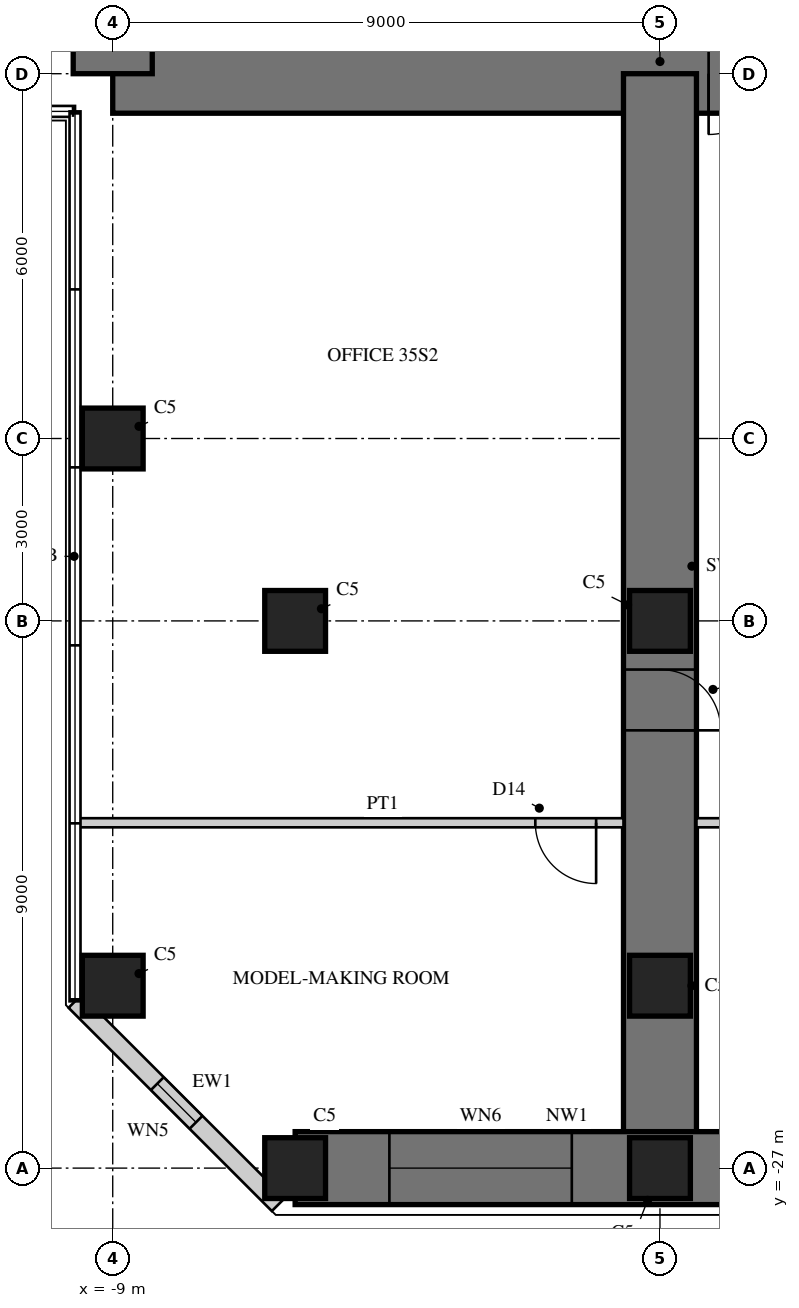
"""IFC4 building model, lengths in metres.
Left out: names, types, materials, properties, quantities, classifications, styles, units other than length and angle.
Written with IfcOpenShell. Run it as: python <this file> out.ifc"""

import sys

from ifc_helpers import new_model, si_unit, direction, frame, frame_2d, origin, origin_2d, place, context, subcontext, project, spatial, rectangle, hollow_rectangle, extrude, element, fill, save


model = new_model("IFC4")
c1 = context("Model", 3, precision=1e-05, world=origin(), true_north=direction((0.0, 1.0)))
c2 = subcontext(c1, "Body", "Model", "MODEL_VIEW")
j1 = project(units=[si_unit("LENGTHUNIT", "METRE"), si_unit("PLANEANGLEUNIT", "RADIAN")], contexts=[c1])
p1 = place(None, origin())
s1 = spatial("IfcSite", under=j1, at=p1, CompositionType="ELEMENT")
p2 = place(p1, origin())
s2 = spatial("IfcBuilding", under=s1, at=p2, CompositionType="ELEMENT")
p3 = place(p2, frame((0.0, 0.0, 144.5)))
s3 = spatial("IfcBuildingStorey", under=s2, at=p3, CompositionType="ELEMENT", Elevation=144.5)
p4 = place(p3, frame((-9.0, -9.0, 0.0), z_axis=(0.0, 0.0, 1.0), x_axis=(1.0, 0.0, 0.0)))
e1 = element("IfcWall", 1, at=p4, inside=s3, PredefinedType="SHEAR", context=c2, shape_type="SweptSolid", body=[
    extrude(rectangle(XDim=18.0, YDim=1.3, at=frame_2d((9.0, 0.0))), origin(), (0.0, 0.0, 1.0), 4.0),
])
p5 = place(p4, frame((9.8, 0.0, 0.0)))
e2 = element("IfcOpeningElement", 2, at=p5, cuts=e1, PredefinedType="OPENING", context=c2, shape_type="SweptSolid", body=[
    extrude(rectangle(XDim=1.0, YDim=2.4, at=frame_2d((0.5, 1.2))), frame((0.0, 0.66, 0.0), z_axis=(0.0, -1.0, 0.0), x_axis=(1.0, 0.0, 0.0)), (0.0, 0.0, 1.0), 1.32),
])
p6 = place(p3, frame((-9.0, 9.0, 0.0), z_axis=(0.0, 0.0, 1.0), x_axis=(0.0, -1.0, 0.0)))
e3 = element("IfcWall", 3, at=p6, inside=s3, PredefinedType="SHEAR", context=c2, shape_type="SweptSolid", body=[
    extrude(rectangle(XDim=18.0, YDim=1.3, at=frame_2d((9.0, 0.0))), origin(), (0.0, 0.0, 1.0), 4.0),
])
p7 = place(p6, frame((9.8, 0.0, 0.0)))
e4 = element("IfcOpeningElement", 4, at=p7, cuts=e3, PredefinedType="OPENING", context=c2, shape_type="SweptSolid", body=[
    extrude(rectangle(XDim=1.0, YDim=2.4, at=frame_2d((0.5, 1.2))), frame((0.0, 0.66, 0.0), z_axis=(0.0, -1.0, 0.0), x_axis=(1.0, 0.0, 0.0)), (0.0, 0.0, 1.0), 1.32),
])
p8 = place(p3, frame((0.0, -9.0, 0.0), z_axis=(0.0, 0.0, 1.0), x_axis=(0.0, -1.0, 0.0)))
e5 = element("IfcWall", 5, at=p8, inside=s3, PredefinedType="SHEAR", context=c2, shape_type="SweptSolid", body=[
    extrude(rectangle(XDim=18.0, YDim=1.2, at=frame_2d((9.0, 0.0))), origin(), (0.0, 0.0, 1.0), 4.0),
])
p9 = place(p8, frame((9.8, 0.0, 0.0)))
e6 = element("IfcOpeningElement", 6, at=p9, cuts=e5, PredefinedType="OPENING", context=c2, shape_type="SweptSolid", body=[
    extrude(rectangle(XDim=1.0, YDim=2.2, at=frame_2d((0.5, 1.1))), frame((0.0, 0.61, 0.0), z_axis=(0.0, -1.0, 0.0), x_axis=(1.0, 0.0, 0.0)), (0.0, 0.0, 1.0), 1.22),
])
p10 = place(p3, frame((-6.0, -27.0, 0.0), z_axis=(0.0, 0.0, 1.0), x_axis=(1.0, 0.0, 0.0)))
e7 = element("IfcWall", 7, at=p10, inside=s3, PredefinedType="SHEAR", context=c2, shape_type="SweptSolid", body=[
    extrude(rectangle(XDim=12.0, YDim=1.2, at=frame_2d((6.0, 0.0))), origin(), (0.0, 0.0, 1.0), 4.0),
])
p11 = place(p10, frame((1.55, 0.0, 0.6)))
e8 = element("IfcOpeningElement", 8, at=p11, cuts=e7, PredefinedType="OPENING", context=c2, shape_type="SweptSolid", body=[
    extrude(rectangle(XDim=3.0, YDim=2.4, at=frame_2d((1.5, 1.2))), frame((0.0, 0.61, 0.0), z_axis=(0.0, -1.0, 0.0), x_axis=(1.0, 0.0, 0.0)), (0.0, 0.0, 1.0), 1.22),
])
p12 = place(p10, frame((7.45, 0.0, 0.6)))
e9 = element("IfcOpeningElement", 9, at=p12, cuts=e7, PredefinedType="OPENING", context=c2, shape_type="SweptSolid", body=[
    extrude(rectangle(XDim=3.0, YDim=2.4, at=frame_2d((1.5, 1.2))), frame((0.0, 0.61, 0.0), z_axis=(0.0, -1.0, 0.0), x_axis=(1.0, 0.0, 0.0)), (0.0, 0.0, 1.0), 1.22),
])
for number, where, z_axis, x_axis in (
    (10, (-9.0, -15.0, 0.0), (0.0, 0.0, 1.0), (1.0, 0.0, 0.0)),
    (11, (-9.0, -24.0, 0.0), (0.0, 0.0, 1.0), (1.0, 0.0, 0.0)),
    (12, (-6.0, -27.0, 0.0), (0.0, 0.0, 1.0), (1.0, 0.0, 0.0)),
    (13, (0.0, -27.0, 0.0), (0.0, 0.0, 1.0), (1.0, 0.0, 0.0)),
    (14, (-6.0, -18.0, 0.0), (0.0, 0.0, 1.0), (1.0, 0.0, 0.0)),
    (15, (0.0, -18.0, 0.0), (0.0, 0.0, 1.0), (1.0, 0.0, 0.0)),
    (16, (0.0, -24.0, 0.0), (0.0, 0.0, 1.0), (1.0, 0.0, 0.0)),
):
    element("IfcColumn", number, at=place(p3, frame(where, z_axis=z_axis, x_axis=x_axis)), inside=s3, PredefinedType="COLUMN", context=c2, shape_type="SweptSolid", body=[
        extrude(rectangle(XDim=1.0, YDim=1.0, at=origin_2d()), origin(), (0.0, 0.0, 1.0), 4.0),
    ])
p13 = place(p3, frame((-9.62, -24.257, 0.0), z_axis=(0.0, 0.0, 1.0), x_axis=(0.707106781187, -0.707106781187, 0.0)))
e17 = element("IfcWall", 17, at=p13, inside=s3, PredefinedType="SOLIDWALL", context=c2, shape_type="SweptSolid", body=[
    extrude(rectangle(XDim=4.728, YDim=0.3, at=frame_2d((2.364, 0.0))), origin(), (0.0, 0.0, 1.0), 3.8),
])
p14 = place(p13, frame((1.914, 0.0, 0.3)))
e18 = element("IfcOpeningElement", 18, at=p14, cuts=e17, PredefinedType="OPENING", context=c2, shape_type="SweptSolid", body=[
    extrude(rectangle(XDim=0.9, YDim=2.4, at=frame_2d((0.45, 1.2))), frame((0.0, 0.16, 0.0), z_axis=(0.0, -1.0, 0.0), x_axis=(1.0, 0.0, 0.0)), (0.0, 0.0, 1.0), 0.32),
])
p15 = place(p3, frame((0.6, -21.32, 0.0), z_axis=(0.0, 0.0, 1.0), x_axis=(1.0, 0.0, 0.0)))
e19 = element("IfcWall", 19, at=p15, inside=s3, PredefinedType="PARTITIONING", context=c2, shape_type="SweptSolid", body=[
    extrude(rectangle(XDim=8.98, YDim=0.15, at=frame_2d((4.49, 0.0))), origin(), (0.0, 0.0, 1.0), 3.8),
])
p16 = place(p15, frame((0.45, 0.0, 0.0)))
e20 = element("IfcOpeningElement", 20, at=p16, cuts=e19, PredefinedType="OPENING", context=c2, shape_type="SweptSolid", body=[
    extrude(rectangle(XDim=1.0, YDim=2.2, at=frame_2d((0.5, 1.1))), frame((0.0, 0.085, 0.0), z_axis=(0.0, -1.0, 0.0), x_axis=(1.0, 0.0, 0.0)), (0.0, 0.0, 1.0), 0.17),
])
p17 = place(p3, frame((-9.58, -21.32, 0.0), z_axis=(0.0, 0.0, 1.0), x_axis=(1.0, 0.0, 0.0)))
e21 = element("IfcWall", 21, at=p17, inside=s3, PredefinedType="PARTITIONING", context=c2, shape_type="SweptSolid", body=[
    extrude(rectangle(XDim=8.98, YDim=0.15, at=frame_2d((4.49, 0.0))), origin(), (0.0, 0.0, 1.0), 3.8),
])
p18 = place(p17, frame((7.53, 0.0, 0.0)))
e22 = element("IfcOpeningElement", 22, at=p18, cuts=e21, PredefinedType="OPENING", context=c2, shape_type="SweptSolid", body=[
    extrude(rectangle(XDim=1.0, YDim=2.2, at=frame_2d((0.5, 1.1))), frame((0.0, 0.085, 0.0), z_axis=(0.0, -1.0, 0.0), x_axis=(1.0, 0.0, 0.0)), (0.0, 0.0, 1.0), 0.17),
])
p19 = place(p14, origin())
e23 = element("IfcWindow", 23, at=p19, inside=s3, PartitioningType="SINGLE_PANEL", PredefinedType="WINDOW", context=c2, shape_type="SweptSolid", body=[
    extrude(hollow_rectangle(XDim=0.9, YDim=2.4, WallThickness=0.06, at=frame_2d((0.45, 1.2))), frame((0.0, 0.03, 0.0), z_axis=(0.0, -1.0, 0.0), x_axis=(1.0, 0.0, 0.0)), (0.0, 0.0, 1.0), 0.06),
    extrude(rectangle(XDim=0.779, YDim=2.279, at=frame_2d((0.45, 1.2))), frame((0.0, 0.03, 0.0), z_axis=(0.0, -1.0, 0.0), x_axis=(1.0, 0.0, 0.0)), (0.0, 0.0, 1.0), 0.06),
])
fill(e18, e23)
p20 = place(p11, origin())
e24 = element("IfcWindow", 24, at=p20, inside=s3, PartitioningType="SINGLE_PANEL", PredefinedType="WINDOW", context=c2, shape_type="SweptSolid", body=[
    extrude(hollow_rectangle(XDim=3.0, YDim=2.4, WallThickness=0.06, at=frame_2d((1.5, 1.2))), frame((0.0, 0.03, 0.0), z_axis=(0.0, -1.0, 0.0), x_axis=(1.0, 0.0, 0.0)), (0.0, 0.0, 1.0), 0.06),
    extrude(rectangle(XDim=2.879, YDim=2.279, at=frame_2d((1.5, 1.2))), frame((0.0, 0.03, 0.0), z_axis=(0.0, -1.0, 0.0), x_axis=(1.0, 0.0, 0.0)), (0.0, 0.0, 1.0), 0.06),
])
fill(e8, e24)
p21 = place(p18, frame((1.0, 0.0, 0.0), z_axis=(0.0, 0.0, 1.0), x_axis=(-1.0, 0.0, 0.0)))
e25 = element("IfcDoor", 25, at=p21, inside=s3, OperationType="SINGLE_SWING_LEFT", PredefinedType="DOOR", context=c2, shape_type="SweptSolid", body=[
    extrude(rectangle(XDim=1.0, YDim=2.2, at=frame_2d((0.5, 1.1))), frame((0.0, 0.025, 0.0), z_axis=(0.0, -1.0, 0.0), x_axis=(1.0, 0.0, 0.0)), (0.0, 0.0, 1.0), 0.05),
])
fill(e22, e25)
p22 = place(p9, origin())
e26 = element("IfcDoor", 26, at=p22, inside=s3, OperationType="SINGLE_SWING_RIGHT", PredefinedType="DOOR", context=c2, shape_type="SweptSolid", body=[
    extrude(rectangle(XDim=1.0, YDim=2.2, at=frame_2d((0.5, 1.1))), frame((0.0, 0.025, 0.0), z_axis=(0.0, -1.0, 0.0), x_axis=(1.0, 0.0, 0.0)), (0.0, 0.0, 1.0), 0.05),
])
fill(e6, e26)
p23 = place(p5, frame((1.0, 0.0, 0.0), z_axis=(0.0, 0.0, 1.0), x_axis=(-1.0, 0.0, 0.0)))
e27 = element("IfcDoor", 27, at=p23, inside=s3, OperationType="SINGLE_SWING_RIGHT", PredefinedType="DOOR", context=c2, shape_type="SweptSolid", body=[
    extrude(rectangle(XDim=1.0, YDim=2.4, at=frame_2d((0.5, 1.2))), frame((0.0, -0.005, 0.0), z_axis=(0.0, -1.0, 0.0), x_axis=(1.0, 0.0, 0.0)), (0.0, 0.0, 1.0), 0.05),
])
fill(e2, e27)
save(model, sys.argv[1])
